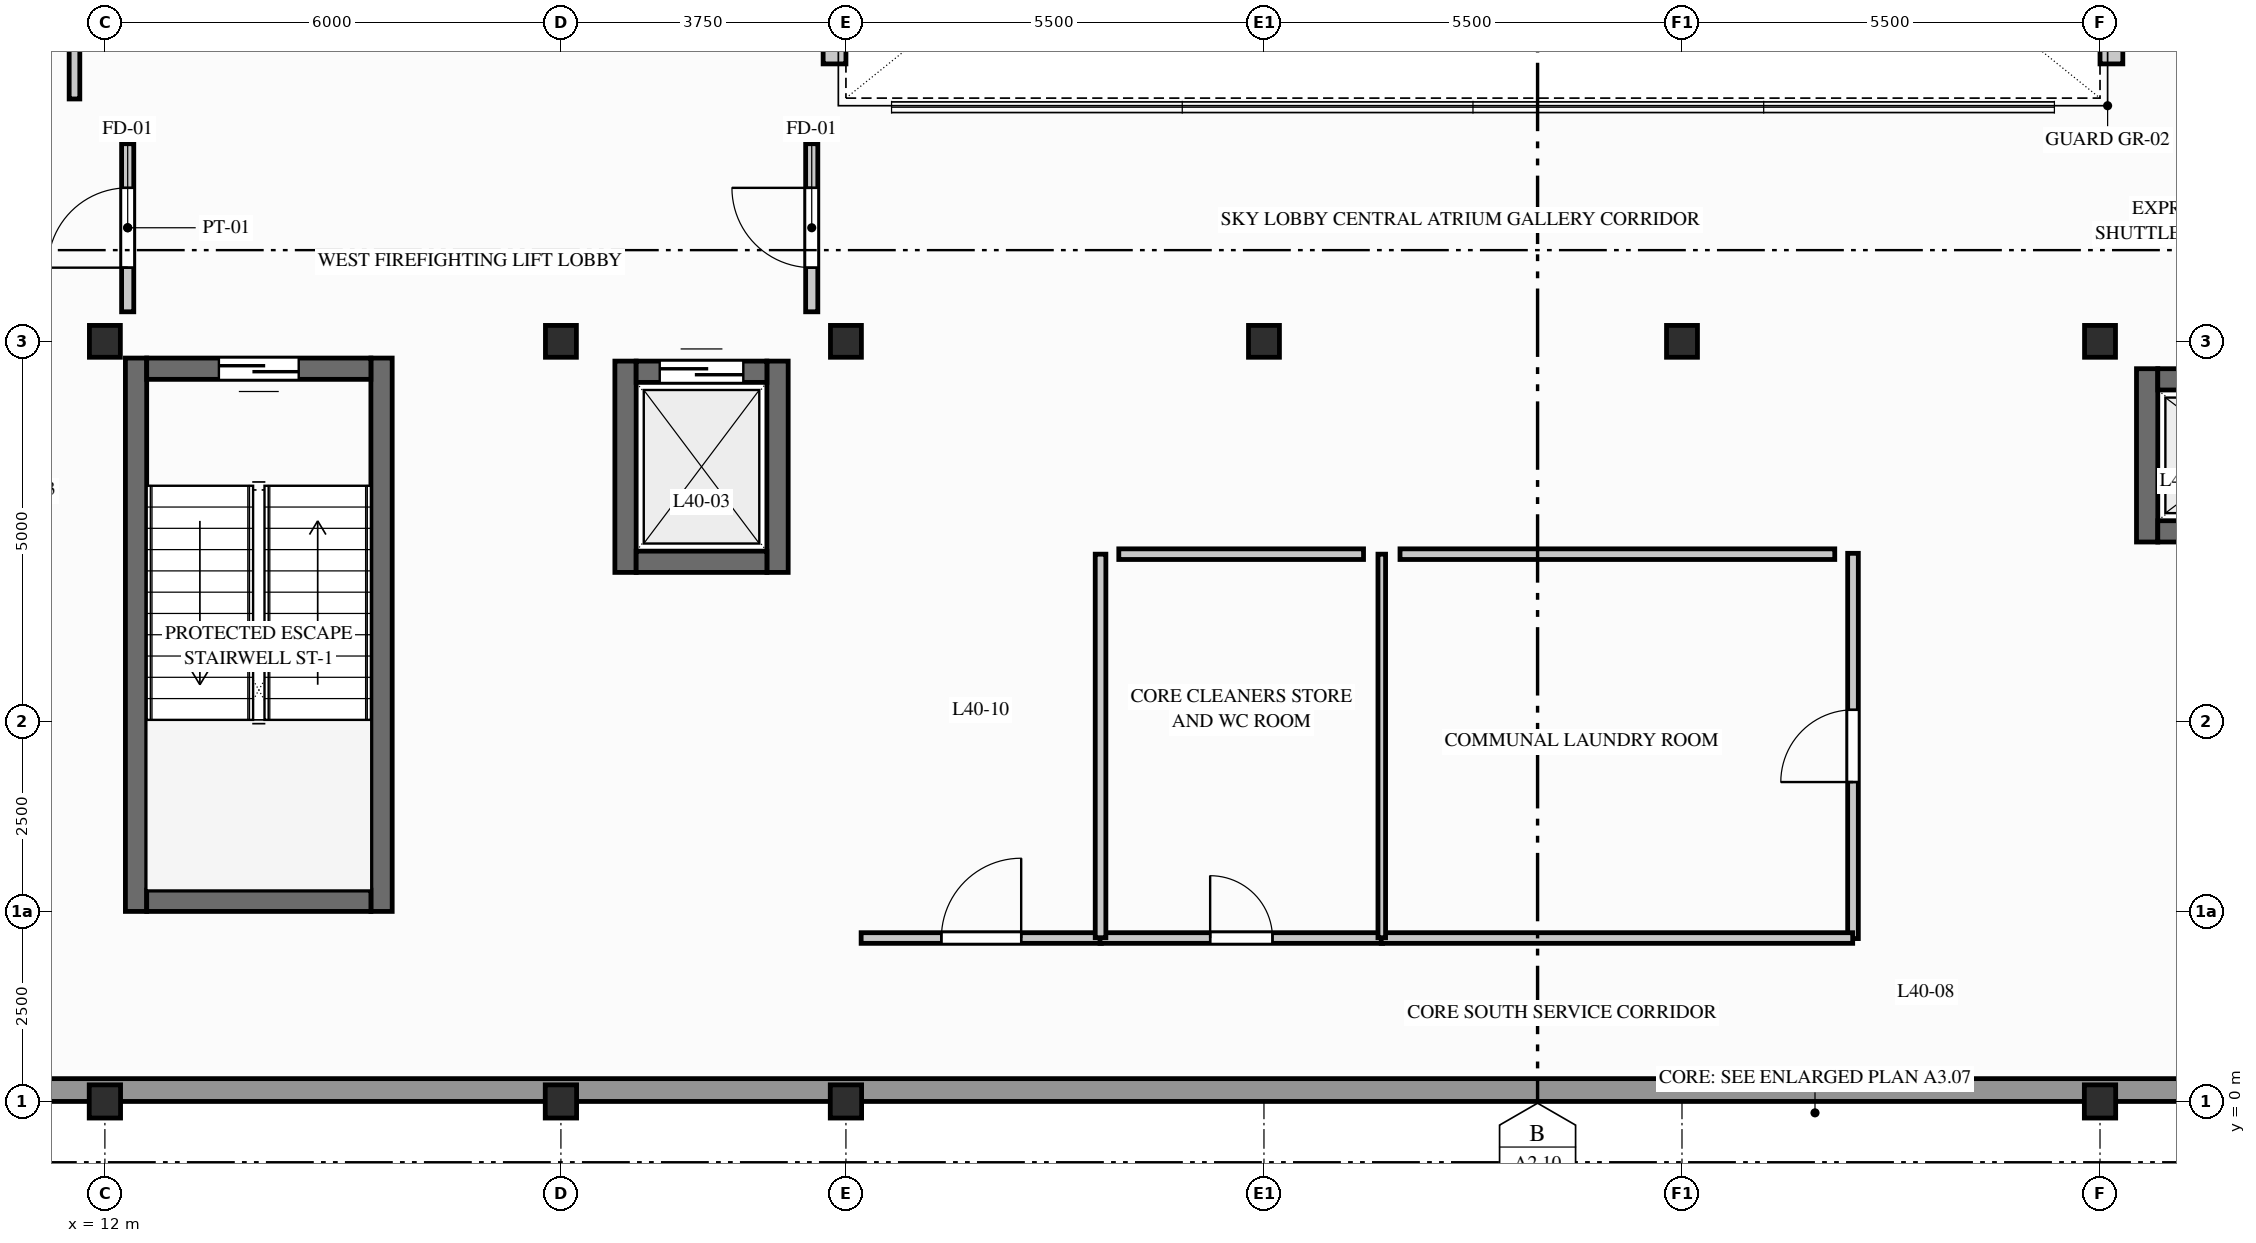
"""IFC4 building model, lengths in metres.
Left out: names, types, materials, properties, quantities, classifications, styles, units other than length and angle.
Written with IfcOpenShell. Run it as: python <this file> out.ifc"""

import sys

from ifc_helpers import new_model, si_unit, direction, frame, frame_2d, origin, origin_2d, place, context, subcontext, project, spatial, rectangle, i_section, extrude, element, fill, save


model = new_model("IFC4")
c1 = context("Model", 3, precision=1e-05, world=origin(), true_north=direction((0.0, 1.0)))
c2 = subcontext(c1, "Body", "Model", "MODEL_VIEW")
j1 = project(units=[si_unit("LENGTHUNIT", "METRE"), si_unit("PLANEANGLEUNIT", "RADIAN")], contexts=[c1])
p1 = place(None, origin())
s1 = spatial("IfcSite", under=j1, at=p1, CompositionType="ELEMENT")
p2 = place(p1, origin())
s2 = spatial("IfcBuilding", under=s1, at=p2, CompositionType="ELEMENT")
p3 = place(p2, frame((0.0, 0.0, 134.5)))
s3 = spatial("IfcBuildingStorey", under=s2, at=p3, CompositionType="ELEMENT", Elevation=134.5)
p4 = place(p3, frame((12.0, 0.0, 0.0), z_axis=(0.0, 0.0, 1.0), x_axis=(1.0, 0.0, 0.0)))
e1 = element("IfcColumn", 1, at=p4, inside=s3, PredefinedType="COLUMN", context=c2, shape_type="SweptSolid", body=[
    extrude(i_section(OverallWidth=0.412, OverallDepth=0.437, WebThickness=0.036, FlangeThickness=0.058, FilletRadius=0.015, at=origin_2d()), origin(), (0.0, 0.0, 1.0), 4.2),
])
p5 = place(p3, frame((12.0, 10.0, 0.0), z_axis=(0.0, 0.0, 1.0), x_axis=(1.0, 0.0, 0.0)))
e2 = element("IfcColumn", 2, at=p5, inside=s3, PredefinedType="COLUMN", context=c2, shape_type="SweptSolid", body=[
    extrude(i_section(OverallWidth=0.407, OverallDepth=0.419, WebThickness=0.031, FlangeThickness=0.049, FilletRadius=0.015, at=origin_2d()), origin(), (0.0, 0.0, 1.0), 4.2),
])
p6 = place(p3, frame((18.0, 0.0, 0.0), z_axis=(0.0, 0.0, 1.0), x_axis=(1.0, 0.0, 0.0)))
e3 = element("IfcColumn", 3, at=p6, inside=s3, PredefinedType="COLUMN", context=c2, shape_type="SweptSolid", body=[
    extrude(i_section(OverallWidth=0.412, OverallDepth=0.437, WebThickness=0.036, FlangeThickness=0.058, FilletRadius=0.015, at=origin_2d()), origin(), (0.0, 0.0, 1.0), 4.2),
])
p7 = place(p3, frame((18.0, 10.0, 0.0), z_axis=(0.0, 0.0, 1.0), x_axis=(1.0, 0.0, 0.0)))
e4 = element("IfcColumn", 4, at=p7, inside=s3, PredefinedType="COLUMN", context=c2, shape_type="SweptSolid", body=[
    extrude(i_section(OverallWidth=0.407, OverallDepth=0.419, WebThickness=0.031, FlangeThickness=0.049, FilletRadius=0.015, at=origin_2d()), origin(), (0.0, 0.0, 1.0), 4.2),
])
p8 = place(p3, frame((21.75, 0.0, 0.0), z_axis=(0.0, 0.0, 1.0), x_axis=(1.0, 0.0, 0.0)))
e5 = element("IfcColumn", 5, at=p8, inside=s3, PredefinedType="COLUMN", context=c2, shape_type="SweptSolid", body=[
    extrude(i_section(OverallWidth=0.412, OverallDepth=0.437, WebThickness=0.036, FlangeThickness=0.058, FilletRadius=0.015, at=origin_2d()), origin(), (0.0, 0.0, 1.0), 4.2),
])
for number, where, z_axis, x_axis in (
    (6, (21.75, 10.0, 0.0), (0.0, 0.0, 1.0), (1.0, 0.0, 0.0)),
    (7, (27.25, 10.0, 0.0), (0.0, 0.0, 1.0), (1.0, 0.0, 0.0)),
    (8, (32.75, 10.0, 0.0), (0.0, 0.0, 1.0), (1.0, 0.0, 0.0)),
):
    element("IfcColumn", number, at=place(p3, frame(where, z_axis=z_axis, x_axis=x_axis)), inside=s3, PredefinedType="COLUMN", context=c2, shape_type="SweptSolid", body=[
        extrude(i_section(OverallWidth=0.407, OverallDepth=0.419, WebThickness=0.031, FlangeThickness=0.049, FilletRadius=0.015, at=origin_2d()), origin(), (0.0, 0.0, 1.0), 4.2),
    ])
p9 = place(p3, frame((38.25, 0.0, 0.0), z_axis=(0.0, 0.0, 1.0), x_axis=(1.0, 0.0, 0.0)))
e9 = element("IfcColumn", 9, at=p9, inside=s3, PredefinedType="COLUMN", context=c2, shape_type="SweptSolid", body=[
    extrude(i_section(OverallWidth=0.412, OverallDepth=0.437, WebThickness=0.036, FlangeThickness=0.058, FilletRadius=0.015, at=origin_2d()), origin(), (0.0, 0.0, 1.0), 4.2),
])
p10 = place(p3, frame((38.25, 10.0, 0.0), z_axis=(0.0, 0.0, 1.0), x_axis=(1.0, 0.0, 0.0)))
e10 = element("IfcColumn", 10, at=p10, inside=s3, PredefinedType="COLUMN", context=c2, shape_type="SweptSolid", body=[
    extrude(i_section(OverallWidth=0.407, OverallDepth=0.419, WebThickness=0.031, FlangeThickness=0.049, FilletRadius=0.015, at=origin_2d()), origin(), (0.0, 0.0, 1.0), 4.2),
])
p11 = place(p3, frame((2.5, 0.15, 0.0), z_axis=(0.0, 0.0, 1.0), x_axis=(1.0, 0.0, 0.0)))
e11 = element("IfcWall", 11, at=p11, inside=s3, PredefinedType="STANDARD", context=c2, shape_type="SweptSolid", body=[
    extrude(rectangle(XDim=55.0, YDim=0.3, at=frame_2d((27.5, 0.0))), origin(), (0.0, 0.0, 1.0), 3.422),
])
p12 = place(p3, frame((21.6, 26.05, 0.0), z_axis=(0.0, 0.0, 1.0), x_axis=(0.0, -1.0, 0.0)))
e12 = element("IfcWall", 12, at=p12, inside=s3, PredefinedType="STANDARD", context=c2, shape_type="SweptSolid", body=[
    extrude(rectangle(XDim=12.4, YDim=0.3, at=frame_2d((6.2, 0.0))), origin(), (0.0, 0.0, 1.0), 3.343),
])
p13 = place(p12, frame((3.4, 0.0, 0.5)))
e13 = element("IfcOpeningElement", 13, at=p13, cuts=e12, PredefinedType="OPENING", context=c2, shape_type="SweptSolid", body=[
    extrude(rectangle(XDim=1.2, YDim=1.6, at=frame_2d((0.6, 0.8))), frame((0.0, 0.16, 0.0), z_axis=(0.0, -1.0, 0.0), x_axis=(1.0, 0.0, 0.0)), (0.0, 0.0, 1.0), 0.32),
])
p14 = place(p3, frame((38.4, 13.65, 0.0), z_axis=(0.0, 0.0, 1.0), x_axis=(0.0, 1.0, 0.0)))
e14 = element("IfcWall", 14, at=p14, inside=s3, PredefinedType="STANDARD", context=c2, shape_type="SweptSolid", body=[
    extrude(rectangle(XDim=12.4, YDim=0.3, at=frame_2d((6.2, 0.0))), origin(), (0.0, 0.0, 1.0), 3.343),
])
p15 = place(p14, frame((3.2, 0.0, 0.5)))
e15 = element("IfcOpeningElement", 15, at=p15, cuts=e14, PredefinedType="OPENING", context=c2, shape_type="SweptSolid", body=[
    extrude(rectangle(XDim=1.2, YDim=1.6, at=frame_2d((0.6, 0.8))), frame((0.0, 0.16, 0.0), z_axis=(0.0, -1.0, 0.0), x_axis=(1.0, 0.0, 0.0)), (0.0, 0.0, 1.0), 0.32),
])
for number, where, z_axis, x_axis in (
    (16, (12.41, 2.5, 0.0), (0.0, 0.0, 1.0), (0.0, 1.0, 0.0)),
    (17, (15.64, 2.5, 0.0), (0.0, 0.0, 1.0), (0.0, 1.0, 0.0)),
):
    element("IfcWall", number, at=place(p3, frame(where, z_axis=z_axis, x_axis=x_axis)), inside=s3, PredefinedType="SHEAR", context=c2, shape_type="SweptSolid", body=[
        extrude(rectangle(XDim=7.28, YDim=0.28, at=frame_2d((3.64, 0.0))), origin(), (0.0, 0.0, 1.0), 3.98),
    ])
p16 = place(p3, frame((12.55, 2.64, 0.0), z_axis=(0.0, 0.0, 1.0), x_axis=(1.0, 0.0, 0.0)))
e18 = element("IfcWall", 18, at=p16, inside=s3, PredefinedType="SHEAR", context=c2, shape_type="SweptSolid", body=[
    extrude(rectangle(XDim=2.95, YDim=0.28, at=frame_2d((1.475, 0.0))), origin(), (0.0, 0.0, 1.0), 3.98),
])
p17 = place(p3, frame((15.5, 9.64, 0.0), z_axis=(0.0, 0.0, 1.0), x_axis=(-1.0, 0.0, 0.0)))
e19 = element("IfcWall", 19, at=p17, inside=s3, PredefinedType="SHEAR", context=c2, shape_type="SweptSolid", body=[
    extrude(rectangle(XDim=2.95, YDim=0.28, at=frame_2d((1.475, 0.0))), origin(), (0.0, 0.0, 1.0), 3.98),
])
p18 = place(p17, frame((0.95, 0.0, 0.0)))
e20 = element("IfcOpeningElement", 20, at=p18, cuts=e19, PredefinedType="OPENING", context=c2, shape_type="SweptSolid", body=[
    extrude(rectangle(XDim=1.05, YDim=2.06, at=frame_2d((0.525, 1.03))), frame((0.0, 0.15, 0.0), z_axis=(0.0, -1.0, 0.0), x_axis=(1.0, 0.0, 0.0)), (0.0, 0.0, 1.0), 0.3),
])
for number, where, z_axis, x_axis in (
    (21, (18.85, 6.96, 0.0), (0.0, 0.0, 1.0), (0.0, 1.0, 0.0)),
    (22, (20.85, 6.96, 0.0), (0.0, 0.0, 1.0), (0.0, 1.0, 0.0)),
):
    element("IfcWall", number, at=place(p3, frame(where, z_axis=z_axis, x_axis=x_axis)), inside=s3, PredefinedType="SHEAR", context=c2, shape_type="SweptSolid", body=[
        extrude(rectangle(XDim=2.78, YDim=0.28, at=frame_2d((1.39, 0.0))), origin(), (0.0, 0.0, 1.0), 3.98),
    ])
p19 = place(p3, frame((18.99, 7.1, 0.0), z_axis=(0.0, 0.0, 1.0), x_axis=(1.0, 0.0, 0.0)))
e23 = element("IfcWall", 23, at=p19, inside=s3, PredefinedType="SHEAR", context=c2, shape_type="SweptSolid", body=[
    extrude(rectangle(XDim=1.72, YDim=0.28, at=frame_2d((0.86, 0.0))), origin(), (0.0, 0.0, 1.0), 3.98),
])
p20 = place(p3, frame((18.99, 9.6, 0.0), z_axis=(0.0, 0.0, 1.0), x_axis=(1.0, 0.0, 0.0)))
e24 = element("IfcWall", 24, at=p20, inside=s3, PredefinedType="SHEAR", context=c2, shape_type="SweptSolid", body=[
    extrude(rectangle(XDim=1.72, YDim=0.28, at=frame_2d((0.86, 0.0))), origin(), (0.0, 0.0, 1.0), 3.98),
])
p21 = place(p20, frame((0.31, 0.0, 0.0)))
e25 = element("IfcOpeningElement", 25, at=p21, cuts=e24, PredefinedType="OPENING", context=c2, shape_type="SweptSolid", body=[
    extrude(rectangle(XDim=1.1, YDim=2.06, at=frame_2d((0.55, 1.03))), frame((0.0, 0.15, 0.0), z_axis=(0.0, -1.0, 0.0), x_axis=(1.0, 0.0, 0.0)), (0.0, 0.0, 1.0), 0.3),
])
p22 = place(p3, frame((38.87, 7.36, 0.0), z_axis=(0.0, 0.0, 1.0), x_axis=(0.0, 1.0, 0.0)))
e26 = element("IfcWall", 26, at=p22, inside=s3, PredefinedType="SHEAR", context=c2, shape_type="SweptSolid", body=[
    extrude(rectangle(XDim=2.28, YDim=0.28, at=frame_2d((1.14, 0.0))), origin(), (0.0, 0.0, 1.0), 3.98),
])
p23 = place(p3, frame((39.01, 7.5, 0.0), z_axis=(0.0, 0.0, 1.0), x_axis=(1.0, 0.0, 0.0)))
e27 = element("IfcWall", 27, at=p23, inside=s3, PredefinedType="SHEAR", context=c2, shape_type="SweptSolid", body=[
    extrude(rectangle(XDim=2.22, YDim=0.28, at=frame_2d((1.11, 0.0))), origin(), (0.0, 0.0, 1.0), 3.98),
])
p24 = place(p3, frame((39.01, 9.5, 0.0), z_axis=(0.0, 0.0, 1.0), x_axis=(1.0, 0.0, 0.0)))
e28 = element("IfcWall", 28, at=p24, inside=s3, PredefinedType="SHEAR", context=c2, shape_type="SweptSolid", body=[
    extrude(rectangle(XDim=2.22, YDim=0.28, at=frame_2d((1.11, 0.0))), origin(), (0.0, 0.0, 1.0), 3.98),
])
p25 = place(p24, frame((0.56, 0.0, 0.0)))
e29 = element("IfcOpeningElement", 29, at=p25, cuts=e28, PredefinedType="OPENING", context=c2, shape_type="SweptSolid", body=[
    extrude(rectangle(XDim=1.1, YDim=2.06, at=frame_2d((0.55, 1.03))), frame((0.0, 0.15, 0.0), z_axis=(0.0, -1.0, 0.0), x_axis=(1.0, 0.0, 0.0)), (0.0, 0.0, 1.0), 0.3),
])
p26 = place(p3, frame((35.0, 2.143, 0.0), z_axis=(0.0, 0.0, 1.0), x_axis=(0.0, 1.0, 0.0)))
e30 = element("IfcWall", 30, at=p26, inside=s3, PredefinedType="PARTITIONING", context=c2, shape_type="SweptSolid", body=[
    extrude(rectangle(XDim=5.069, YDim=0.14, at=frame_2d((2.534, 0.0))), origin(), (0.0, 0.0, 1.0), 3.98),
])
p27 = place(p26, frame((2.059, 0.0, 0.0)))
e31 = element("IfcOpeningElement", 31, at=p27, cuts=e30, PredefinedType="OPENING", context=c2, shape_type="SweptSolid", body=[
    extrude(rectangle(XDim=0.95, YDim=2.05, at=frame_2d((0.475, 1.025))), frame((0.0, 0.08, 0.0), z_axis=(0.0, -1.0, 0.0), x_axis=(1.0, 0.0, 0.0)), (0.0, 0.0, 1.0), 0.16),
])
p28 = place(p3, frame((21.95, 2.15, 0.0), z_axis=(0.0, 0.0, 1.0), x_axis=(1.0, 0.0, 0.0)))
e32 = element("IfcWall", 32, at=p28, inside=s3, PredefinedType="PARTITIONING", context=c2, shape_type="SweptSolid", body=[
    extrude(rectangle(XDim=3.161, YDim=0.14, at=frame_2d((1.581, 0.0))), origin(), (0.0, 0.0, 1.0), 3.98),
])
p29 = place(p28, frame((1.056, 0.0, 0.0)))
e33 = element("IfcOpeningElement", 33, at=p29, cuts=e32, PredefinedType="OPENING", context=c2, shape_type="SweptSolid", body=[
    extrude(rectangle(XDim=1.05, YDim=2.06, at=frame_2d((0.525, 1.03))), frame((0.0, 0.08, 0.0), z_axis=(0.0, -1.0, 0.0), x_axis=(1.0, 0.0, 0.0)), (0.0, 0.0, 1.0), 0.16),
])
p30 = place(p3, frame((25.093, 2.15, 0.0), z_axis=(0.0, 0.0, 1.0), x_axis=(1.0, 0.0, 0.0)))
e34 = element("IfcWall", 34, at=p30, inside=s3, PredefinedType="PARTITIONING", context=c2, shape_type="SweptSolid", body=[
    extrude(rectangle(XDim=3.719, YDim=0.14, at=frame_2d((1.859, 0.0))), origin(), (0.0, 0.0, 1.0), 3.98),
])
p31 = place(p30, frame((1.449, 0.0, 0.0)))
e35 = element("IfcOpeningElement", 35, at=p31, cuts=e34, PredefinedType="OPENING", context=c2, shape_type="SweptSolid", body=[
    extrude(rectangle(XDim=0.82, YDim=2.02, at=frame_2d((0.41, 1.01))), frame((0.0, 0.08, 0.0), z_axis=(0.0, -1.0, 0.0), x_axis=(1.0, 0.0, 0.0)), (0.0, 0.0, 1.0), 0.16),
])
p32 = place(p3, frame((28.793, 2.15, 0.0), z_axis=(0.0, 0.0, 1.0), x_axis=(1.0, 0.0, 0.0)))
e36 = element("IfcWall", 36, at=p32, inside=s3, PredefinedType="PARTITIONING", context=c2, shape_type="SweptSolid", body=[
    extrude(rectangle(XDim=6.203, YDim=0.14, at=frame_2d((3.102, 0.0))), origin(), (0.0, 0.0, 1.0), 3.98),
])
p33 = place(p3, frame((25.1, 2.154, 0.0), z_axis=(0.0, 0.0, 1.0), x_axis=(0.0, 1.0, 0.0)))
e37 = element("IfcWall", 37, at=p33, inside=s3, PredefinedType="PARTITIONING", context=c2, shape_type="SweptSolid", body=[
    extrude(rectangle(XDim=5.046, YDim=0.14, at=frame_2d((2.523, 0.0))), origin(), (0.0, 0.0, 1.0), 3.98),
])
p34 = place(p3, frame((28.8, 2.154, 0.0), z_axis=(0.0, 0.0, 1.0), x_axis=(0.0, 1.0, 0.0)))
e38 = element("IfcWall", 38, at=p34, inside=s3, PredefinedType="PARTITIONING", context=c2, shape_type="SweptSolid", body=[
    extrude(rectangle(XDim=5.046, YDim=0.1, at=frame_2d((2.523, 0.0))), origin(), (0.0, 0.0, 1.0), 3.98),
])
p35 = place(p3, frame((12.3, 10.389, 0.0), z_axis=(0.0, 0.0, 1.0), x_axis=(0.0, 1.0, 0.0)))
e39 = element("IfcWall", 39, at=p35, inside=s3, PredefinedType="PARTITIONING", context=c2, shape_type="SweptSolid", body=[
    extrude(rectangle(XDim=2.211, YDim=0.16, at=frame_2d((1.106, 0.0))), origin(), (0.0, 0.0, 1.0), 3.98),
])
p36 = place(p35, frame((0.581, 0.0, 0.0)))
e40 = element("IfcOpeningElement", 40, at=p36, cuts=e39, PredefinedType="OPENING", context=c2, shape_type="SweptSolid", body=[
    extrude(rectangle(XDim=1.05, YDim=2.06, at=frame_2d((0.525, 1.03))), frame((0.0, 0.09, 0.0), z_axis=(0.0, -1.0, 0.0), x_axis=(1.0, 0.0, 0.0)), (0.0, 0.0, 1.0), 0.18),
])
p37 = place(p3, frame((21.3, 10.389, 0.0), z_axis=(0.0, 0.0, 1.0), x_axis=(0.0, 1.0, 0.0)))
e41 = element("IfcWall", 41, at=p37, inside=s3, PredefinedType="PARTITIONING", context=c2, shape_type="SweptSolid", body=[
    extrude(rectangle(XDim=2.211, YDim=0.16, at=frame_2d((1.106, 0.0))), origin(), (0.0, 0.0, 1.0), 3.98),
])
p38 = place(p37, frame((0.581, 0.0, 0.0)))
e42 = element("IfcOpeningElement", 42, at=p38, cuts=e41, PredefinedType="OPENING", context=c2, shape_type="SweptSolid", body=[
    extrude(rectangle(XDim=1.05, YDim=2.06, at=frame_2d((0.525, 1.03))), frame((0.0, 0.09, 0.0), z_axis=(0.0, -1.0, 0.0), x_axis=(1.0, 0.0, 0.0)), (0.0, 0.0, 1.0), 0.18),
])
p39 = place(p3, frame((11.6, 13.189, 0.0), z_axis=(0.0, 0.0, 1.0), x_axis=(0.0, 1.0, 0.0)))
e43 = element("IfcWall", 43, at=p39, inside=s3, PredefinedType="PARTITIONING", context=c2, shape_type="SweptSolid", body=[
    extrude(rectangle(XDim=13.511, YDim=0.14, at=frame_2d((6.756, 0.0))), origin(), (0.0, 0.0, 1.0), 3.343),
])
p40 = place(p39, frame((6.231, 0.0, 0.0)))
e44 = element("IfcOpeningElement", 44, at=p40, cuts=e43, PredefinedType="OPENING", context=c2, shape_type="SweptSolid", body=[
    extrude(rectangle(XDim=1.05, YDim=2.06, at=frame_2d((0.525, 1.03))), frame((0.0, 0.08, 0.0), z_axis=(0.0, -1.0, 0.0), x_axis=(1.0, 0.0, 0.0)), (0.0, 0.0, 1.0), 0.16),
])
p41 = place(p3, frame((25.34, 7.2, 0.0), z_axis=(0.0, 0.0, 1.0), x_axis=(1.0, 0.0, 0.0)))
e45 = element("IfcWall", 45, at=p41, inside=s3, PredefinedType="PARTITIONING", context=c2, shape_type="SweptSolid", body=[
    extrude(rectangle(XDim=3.22, YDim=0.14, at=frame_2d((1.61, 0.0))), origin(), (0.0, 0.0, 1.0), 3.98),
])
p42 = place(p3, frame((29.04, 7.2, 0.0), z_axis=(0.0, 0.0, 1.0), x_axis=(1.0, 0.0, 0.0)))
e46 = element("IfcWall", 46, at=p42, inside=s3, PredefinedType="PARTITIONING", context=c2, shape_type="SweptSolid", body=[
    extrude(rectangle(XDim=5.72, YDim=0.14, at=frame_2d((2.86, 0.0))), origin(), (0.0, 0.0, 1.0), 3.98),
])
p43 = place(p18, origin())
e47 = element("IfcDoor", 47, at=p43, inside=s3, OperationType="SINGLE_SWING_RIGHT", PredefinedType="DOOR", context=c2, shape_type="SweptSolid", body=[
    extrude(rectangle(XDim=1.05, YDim=2.06, at=frame_2d((0.525, 1.03))), frame((0.0, 0.025, 0.0), z_axis=(0.0, -1.0, 0.0), x_axis=(1.0, 0.0, 0.0)), (0.0, 0.0, 1.0), 0.05),
])
fill(e20, e47)
p44 = place(p21, origin())
e48 = element("IfcDoor", 48, at=p44, inside=s3, OperationType="SLIDING_TO_RIGHT", PredefinedType="DOOR", context=c2, shape_type="SweptSolid", body=[
    extrude(rectangle(XDim=1.1, YDim=2.06, at=frame_2d((0.55, 1.03))), frame((0.0, 0.025, 0.0), z_axis=(0.0, -1.0, 0.0), x_axis=(1.0, 0.0, 0.0)), (0.0, 0.0, 1.0), 0.05),
])
fill(e25, e48)
p45 = place(p27, origin())
e49 = element("IfcDoor", 49, at=p45, inside=s3, OperationType="SINGLE_SWING_LEFT", PredefinedType="DOOR", context=c2, shape_type="SweptSolid", body=[
    extrude(rectangle(XDim=0.95, YDim=2.05, at=frame_2d((0.475, 1.025))), frame((0.0, 0.025, 0.0), z_axis=(0.0, -1.0, 0.0), x_axis=(1.0, 0.0, 0.0)), (0.0, 0.0, 1.0), 0.05),
])
fill(e31, e49)
p46 = place(p29, origin())
e50 = element("IfcDoor", 50, at=p46, inside=s3, OperationType="SINGLE_SWING_RIGHT", PredefinedType="DOOR", context=c2, shape_type="SweptSolid", body=[
    extrude(rectangle(XDim=1.05, YDim=2.06, at=frame_2d((0.525, 1.03))), frame((0.0, 0.025, 0.0), z_axis=(0.0, -1.0, 0.0), x_axis=(1.0, 0.0, 0.0)), (0.0, 0.0, 1.0), 0.05),
])
fill(e33, e50)
p47 = place(p31, origin())
e51 = element("IfcDoor", 51, at=p47, inside=s3, OperationType="SINGLE_SWING_LEFT", PredefinedType="DOOR", context=c2, shape_type="SweptSolid", body=[
    extrude(rectangle(XDim=0.82, YDim=2.02, at=frame_2d((0.41, 1.01))), frame((0.0, 0.025, 0.0), z_axis=(0.0, -1.0, 0.0), x_axis=(1.0, 0.0, 0.0)), (0.0, 0.0, 1.0), 0.05),
])
fill(e35, e51)
p48 = place(p36, origin())
e52 = element("IfcDoor", 52, at=p48, inside=s3, OperationType="SINGLE_SWING_LEFT", PredefinedType="DOOR", context=c2, shape_type="SweptSolid", body=[
    extrude(rectangle(XDim=1.05, YDim=2.06, at=frame_2d((0.525, 1.03))), frame((0.0, 0.025, 0.0), z_axis=(0.0, -1.0, 0.0), x_axis=(1.0, 0.0, 0.0)), (0.0, 0.0, 1.0), 0.05),
])
fill(e40, e52)
p49 = place(p38, origin())
e53 = element("IfcDoor", 53, at=p49, inside=s3, OperationType="SINGLE_SWING_RIGHT", PredefinedType="DOOR", context=c2, shape_type="SweptSolid", body=[
    extrude(rectangle(XDim=1.05, YDim=2.06, at=frame_2d((0.525, 1.03))), frame((0.0, 0.025, 0.0), z_axis=(0.0, -1.0, 0.0), x_axis=(1.0, 0.0, 0.0)), (0.0, 0.0, 1.0), 0.05),
])
fill(e42, e53)
save(model, sys.argv[1])
